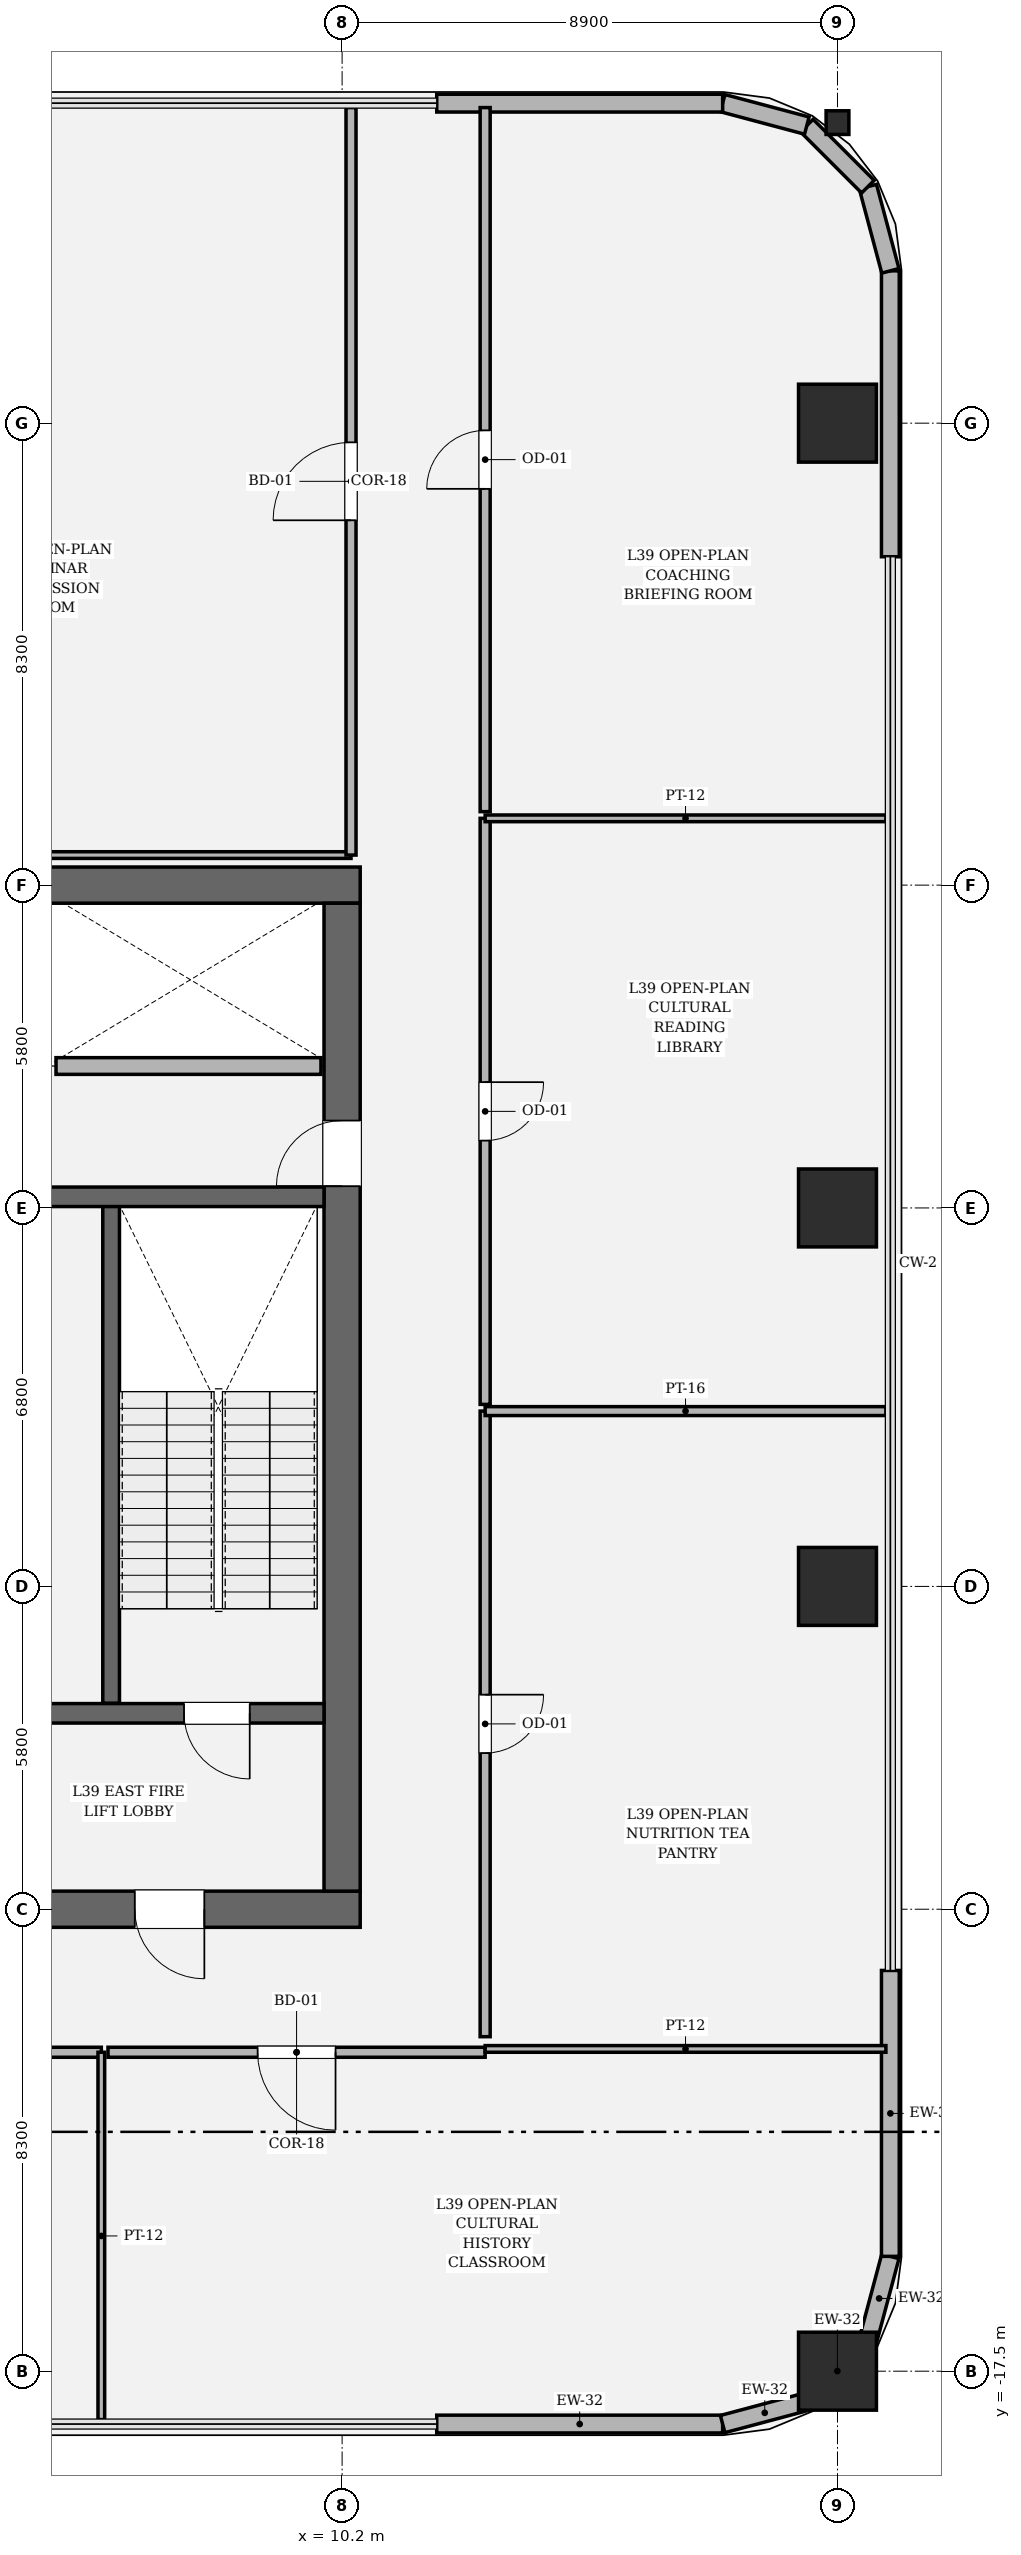
"""IFC4 building model, lengths in metres.
Left out: names, types, materials, properties, quantities, classifications, styles, units other than length and angle.
Written with IfcOpenShell. Run it as: python <this file> out.ifc"""

import sys

from ifc_helpers import new_model, si_unit, direction, frame, frame_2d, origin, origin_2d, place, context, subcontext, project, spatial, rectangle, hollow_rectangle, i_section, extrude, element, fill, save


model = new_model("IFC4")
c1 = context("Model", 3, precision=1e-05, world=origin(), true_north=direction((0.0, 1.0)))
c2 = subcontext(c1, "Body", "Model", "MODEL_VIEW")
j1 = project(units=[si_unit("LENGTHUNIT", "METRE"), si_unit("PLANEANGLEUNIT", "RADIAN")], contexts=[c1])
p1 = place(None, origin())
s1 = spatial("IfcSite", under=j1, at=p1, CompositionType="ELEMENT")
p2 = place(p1, origin())
s2 = spatial("IfcBuilding", under=s1, at=p2, CompositionType="ELEMENT")
p3 = place(p2, frame((0.0, 0.0, 168.15)))
s3 = spatial("IfcBuildingStorey", under=s2, at=p3, CompositionType="ELEMENT", Elevation=168.15)
p4 = place(p3, frame((10.525, -9.2, 0.0), z_axis=(0.0, 0.0, 1.0), x_axis=(-1.0, 0.0, 0.0)))
e1 = element("IfcWall", 1, at=p4, inside=s3, PredefinedType="SHEAR", context=c2, shape_type="SweptSolid", body=[
    extrude(rectangle(XDim=21.05, YDim=0.65, at=frame_2d((10.525, 0.0))), origin(), (0.0, 0.0, 1.0), 4.05),
])
p5 = place(p4, frame((2.8, 0.0, 0.0)))
e2 = element("IfcOpeningElement", 2, at=p5, cuts=e1, PredefinedType="OPENING", context=c2, shape_type="SweptSolid", body=[
    extrude(rectangle(XDim=1.25, YDim=2.25, at=frame_2d((0.625, 1.125))), frame((0.0, 0.335, 0.0), z_axis=(0.0, -1.0, 0.0), x_axis=(1.0, 0.0, 0.0)), (0.0, 0.0, 1.0), 0.67),
])
p6 = place(p4, frame((17.0, 0.0, 0.0)))
e3 = element("IfcOpeningElement", 3, at=p6, cuts=e1, PredefinedType="OPENING", context=c2, shape_type="SweptSolid", body=[
    extrude(rectangle(XDim=1.25, YDim=2.25, at=frame_2d((0.625, 1.125))), frame((0.0, 0.335, 0.0), z_axis=(0.0, -1.0, 0.0), x_axis=(1.0, 0.0, 0.0)), (0.0, 0.0, 1.0), 0.67),
])
p7 = place(p3, frame((-10.525, 9.2, 0.0), z_axis=(0.0, 0.0, 1.0), x_axis=(1.0, 0.0, 0.0)))
e4 = element("IfcWall", 4, at=p7, inside=s3, PredefinedType="SHEAR", context=c2, shape_type="SweptSolid", body=[
    extrude(rectangle(XDim=21.05, YDim=0.65, at=frame_2d((10.525, 0.0))), origin(), (0.0, 0.0, 1.0), 4.05),
])
p8 = place(p3, frame((10.2, 8.875, 0.0), z_axis=(0.0, 0.0, 1.0), x_axis=(0.0, -1.0, 0.0)))
e5 = element("IfcWall", 5, at=p8, inside=s3, PredefinedType="SHEAR", context=c2, shape_type="SweptSolid", body=[
    extrude(rectangle(XDim=17.75, YDim=0.65, at=frame_2d((8.875, 0.0))), origin(), (0.0, 0.0, 1.0), 4.05),
])
p9 = place(p8, frame((3.905, 0.0, 0.0)))
e6 = element("IfcOpeningElement", 6, at=p9, cuts=e5, PredefinedType="OPENING", context=c2, shape_type="SweptSolid", body=[
    extrude(rectangle(XDim=1.18, YDim=2.2, at=frame_2d((0.59, 1.1))), frame((0.0, 0.335, 0.0), z_axis=(0.0, -1.0, 0.0), x_axis=(1.0, 0.0, 0.0)), (0.0, 0.0, 1.0), 0.67),
])
p10 = place(p3, frame((6.05, 3.45, 0.0), z_axis=(0.0, 0.0, 1.0), x_axis=(0.0, -1.0, 0.0)))
e7 = element("IfcWall", 7, at=p10, inside=s3, PredefinedType="SOLIDWALL", context=c2, shape_type="SweptSolid", body=[
    extrude(rectangle(XDim=8.95, YDim=0.3, at=frame_2d((4.475, 0.0))), origin(), (0.0, 0.0, 1.0), 4.05),
])
p11 = place(p3, frame((4.65, -5.68, 0.0), z_axis=(0.0, 0.0, 1.0), x_axis=(1.0, 0.0, 0.0)))
e8 = element("IfcWall", 8, at=p11, inside=s3, PredefinedType="SOLIDWALL", context=c2, shape_type="SweptSolid", body=[
    extrude(rectangle(XDim=5.225, YDim=0.35, at=frame_2d((2.613, 0.0))), origin(), (0.0, 0.0, 1.0), 4.05),
])
p12 = place(p11, frame((2.71, 0.0, 0.0)))
e9 = element("IfcOpeningElement", 9, at=p12, cuts=e8, PredefinedType="OPENING", context=c2, shape_type="SweptSolid", body=[
    extrude(rectangle(XDim=1.18, YDim=2.2, at=frame_2d((0.59, 1.1))), frame((0.0, 0.185, 0.0), z_axis=(0.0, -1.0, 0.0), x_axis=(1.0, 0.0, 0.0)), (0.0, 0.0, 1.0), 0.37),
])
p13 = place(p3, frame((4.65, 3.6, 0.0), z_axis=(0.0, 0.0, 1.0), x_axis=(1.0, 0.0, 0.0)))
e10 = element("IfcWall", 10, at=p13, inside=s3, PredefinedType="SOLIDWALL", context=c2, shape_type="SweptSolid", body=[
    extrude(rectangle(XDim=5.225, YDim=0.35, at=frame_2d((2.613, 0.0))), origin(), (0.0, 0.0, 1.0), 4.05),
])
for number, where, z_axis, x_axis in (
    (11, (19.1, -17.5, 0.0), (0.0, 0.0, 1.0), (1.0, 0.0, 0.0)),
    (12, (19.1, -3.4, 0.0), (0.0, 0.0, 1.0), (1.0, 0.0, 0.0)),
    (13, (19.1, 3.4, 0.0), (0.0, 0.0, 1.0), (1.0, 0.0, 0.0)),
    (14, (19.1, 17.5, 0.0), (0.0, 0.0, 1.0), (1.0, 0.0, 0.0)),
):
    element("IfcColumn", number, at=place(p3, frame(where, z_axis=z_axis, x_axis=x_axis)), inside=s3, PredefinedType="COLUMN", context=c2, shape_type="SweptSolid", body=[
        extrude(hollow_rectangle(XDim=1.4, YDim=1.4, WallThickness=0.042, at=origin_2d()), origin(), (0.0, 0.0, 1.0), 4.05),
    ])
p14 = place(p3, frame((19.1, 22.9, 0.0), z_axis=(0.0, 0.0, 1.0), x_axis=(1.0, 0.0, 0.0)))
e15 = element("IfcColumn", 15, at=p14, inside=s3, PredefinedType="COLUMN", context=c2, shape_type="SweptSolid", body=[
    extrude(i_section(OverallWidth=0.409, OverallDepth=0.425, WebThickness=0.032, FlangeThickness=0.052, FilletRadius=0.018, at=origin_2d()), origin(), (0.0, 0.0, 1.0), 4.048),
])
p15 = place(p3, frame((11.9, -18.45, 0.0), z_axis=(0.0, 0.0, 1.0), x_axis=(1.0, 0.0, 0.0)))
e16 = element("IfcWall", 16, at=p15, inside=s3, PredefinedType="SOLIDWALL", context=c2, shape_type="SweptSolid", body=[
    extrude(rectangle(XDim=5.137, YDim=0.32, at=frame_2d((2.568, 0.0))), origin(), (0.0, 0.0, 1.0), 3.77),
])
p16 = place(p3, frame((17.037, -18.45, 0.0), z_axis=(0.0, 0.0, 1.0), x_axis=(0.966224582397, 0.257701486942, 0.0)))
e17 = element("IfcWall", 17, at=p16, inside=s3, PredefinedType="SOLIDWALL", context=c2, shape_type="SweptSolid", body=[
    extrude(rectangle(XDim=1.565, YDim=0.32, at=frame_2d((0.783, 0.0))), origin(), (0.0, 0.0, 1.0), 3.77),
])
p17 = place(p3, frame((18.549, -18.047, 0.0), z_axis=(0.0, 0.0, 1.0), x_axis=(0.707106781187, 0.707106781187, 0.0)))
e18 = element("IfcWall", 18, at=p17, inside=s3, PredefinedType="SOLIDWALL", context=c2, shape_type="SweptSolid", body=[
    extrude(rectangle(XDim=1.552, YDim=0.32, at=frame_2d((0.776, 0.0))), origin(), (0.0, 0.0, 1.0), 2.444),
])
p18 = place(p3, frame((19.646, -16.949, 0.0), z_axis=(0.0, 0.0, 1.0), x_axis=(0.257847112249, 0.966185730957, 0.0)))
e19 = element("IfcWall", 19, at=p18, inside=s3, PredefinedType="SOLIDWALL", context=c2, shape_type="SweptSolid", body=[
    extrude(rectangle(XDim=1.565, YDim=0.32, at=frame_2d((0.783, 0.0))), origin(), (0.0, 0.0, 1.0), 3.77),
])
p19 = place(p3, frame((20.05, -15.437, 0.0), z_axis=(0.0, 0.0, 1.0), x_axis=(0.0, 1.0, 0.0)))
e20 = element("IfcWall", 20, at=p19, inside=s3, PredefinedType="SOLIDWALL", context=c2, shape_type="SweptSolid", body=[
    extrude(rectangle(XDim=5.137, YDim=0.32, at=frame_2d((2.568, 0.0))), origin(), (0.0, 0.0, 1.0), 3.77),
])
p20 = place(p3, frame((20.05, 15.1, 0.0), z_axis=(0.0, 0.0, 1.0), x_axis=(0.0, 1.0, 0.0)))
e21 = element("IfcWall", 21, at=p20, inside=s3, PredefinedType="SOLIDWALL", context=c2, shape_type="SweptSolid", body=[
    extrude(rectangle(XDim=5.137, YDim=0.32, at=frame_2d((2.568, 0.0))), origin(), (0.0, 0.0, 1.0), 3.77),
])
p21 = place(p3, frame((20.05, 20.237, 0.0), z_axis=(0.0, 0.0, 1.0), x_axis=(-0.257847112249, 0.966185730957, 0.0)))
e22 = element("IfcWall", 22, at=p21, inside=s3, PredefinedType="SOLIDWALL", context=c2, shape_type="SweptSolid", body=[
    extrude(rectangle(XDim=1.565, YDim=0.32, at=frame_2d((0.783, 0.0))), origin(), (0.0, 0.0, 1.0), 3.77),
])
p22 = place(p3, frame((19.646, 21.749, 0.0), z_axis=(0.0, 0.0, 1.0), x_axis=(-0.707028130747, 0.707185422879, 0.0)))
e23 = element("IfcWall", 23, at=p22, inside=s3, PredefinedType="SOLIDWALL", context=c2, shape_type="SweptSolid", body=[
    extrude(rectangle(XDim=1.552, YDim=0.32, at=frame_2d((0.776, 0.0))), origin(), (0.0, 0.0, 1.0), 3.77),
])
p23 = place(p3, frame((18.549, 22.847, 0.0), z_axis=(0.0, 0.0, 1.0), x_axis=(-0.966224582397, 0.257701486942, 0.0)))
e24 = element("IfcWall", 24, at=p23, inside=s3, PredefinedType="SOLIDWALL", context=c2, shape_type="SweptSolid", body=[
    extrude(rectangle(XDim=1.565, YDim=0.32, at=frame_2d((0.783, 0.0))), origin(), (0.0, 0.0, 1.0), 3.77),
])
p24 = place(p3, frame((17.037, 23.25, 0.0), z_axis=(0.0, 0.0, 1.0), x_axis=(-1.0, 0.0, 0.0)))
e25 = element("IfcWall", 25, at=p24, inside=s3, PredefinedType="SOLIDWALL", context=c2, shape_type="SweptSolid", body=[
    extrude(rectangle(XDim=5.137, YDim=0.32, at=frame_2d((2.568, 0.0))), origin(), (0.0, 0.0, 1.0), 3.77),
])
p25 = place(p3, frame((5.06, 5.95, 0.0), z_axis=(0.0, 0.0, 1.0), x_axis=(1.0, 0.0, 0.0)))
e26 = element("IfcWall", 26, at=p25, inside=s3, PredefinedType="SOLIDWALL", context=c2, shape_type="SweptSolid", body=[
    extrude(rectangle(XDim=4.76, YDim=0.3, at=frame_2d((2.38, 0.0))), origin(), (0.0, 0.0, 1.0), 3.77),
])
p26 = place(p3, frame((-7.4, -11.77, 0.0), z_axis=(0.0, 0.0, 1.0), x_axis=(1.0, 0.0, 0.0)))
e27 = element("IfcWall", 27, at=p26, inside=s3, PredefinedType="PARTITIONING", context=c2, shape_type="SweptSolid", body=[
    extrude(rectangle(XDim=13.274, YDim=0.18, at=frame_2d((6.637, 0.0))), origin(), (0.0, 0.0, 1.0), 2.444),
])
p27 = place(p3, frame((5.874, -11.77, 0.0), z_axis=(0.0, 0.0, 1.0), x_axis=(0.0, -1.0, 0.0)))
e28 = element("IfcWall", 28, at=p27, inside=s3, PredefinedType="PARTITIONING", context=c2, shape_type="SweptSolid", body=[
    extrude(rectangle(XDim=6.6, YDim=0.12, at=frame_2d((3.3, 0.0))), origin(), (0.0, 0.0, 1.0), 2.444),
])
p28 = place(p3, frame((5.994, -11.77, 0.0), z_axis=(0.0, 0.0, 1.0), x_axis=(1.0, 0.0, 0.0)))
e29 = element("IfcWall", 29, at=p28, inside=s3, PredefinedType="PARTITIONING", context=c2, shape_type="SweptSolid", body=[
    extrude(rectangle(XDim=6.776, YDim=0.18, at=frame_2d((3.388, 0.0))), origin(), (0.0, 0.0, 1.0), 2.444),
])
p29 = place(p28, frame((2.688, 0.0, 0.0)))
e30 = element("IfcOpeningElement", 30, at=p29, cuts=e29, PredefinedType="OPENING", context=c2, shape_type="SweptSolid", body=[
    extrude(rectangle(XDim=1.4, YDim=2.25, at=frame_2d((0.7, 1.125))), frame((0.0, 0.1, 0.0), z_axis=(0.0, -1.0, 0.0), x_axis=(1.0, 0.0, 0.0)), (0.0, 0.0, 1.0), 0.2),
])
p30 = place(p3, frame((12.77, -11.71, 0.0), z_axis=(0.0, 0.0, 1.0), x_axis=(1.0, 0.0, 0.0)))
e31 = element("IfcWall", 31, at=p30, inside=s3, PredefinedType="PARTITIONING", context=c2, shape_type="SweptSolid", body=[
    extrude(rectangle(XDim=7.2, YDim=0.12, at=frame_2d((3.6, 0.0))), origin(), (0.0, 0.0, 1.0), 2.444),
])
p31 = place(p3, frame((12.77, -11.49, 0.0), z_axis=(0.0, 0.0, 1.0), x_axis=(0.0, 1.0, 0.0)))
e32 = element("IfcWall", 32, at=p31, inside=s3, PredefinedType="PARTITIONING", context=c2, shape_type="SweptSolid", body=[
    extrude(rectangle(XDim=11.24, YDim=0.18, at=frame_2d((5.62, 0.0))), origin(), (0.0, 0.0, 1.0), 2.444),
])
p32 = place(p31, frame((5.095, 0.0, 0.0)))
e33 = element("IfcOpeningElement", 33, at=p32, cuts=e32, PredefinedType="OPENING", context=c2, shape_type="SweptSolid", body=[
    extrude(rectangle(XDim=1.05, YDim=2.2, at=frame_2d((0.525, 1.1))), frame((0.0, 0.1, 0.0), z_axis=(0.0, -1.0, 0.0), x_axis=(1.0, 0.0, 0.0)), (0.0, 0.0, 1.0), 0.2),
])
p33 = place(p3, frame((12.77, -0.25, 0.0), z_axis=(0.0, 0.0, 1.0), x_axis=(1.0, 0.0, 0.0)))
e34 = element("IfcWall", 34, at=p33, inside=s3, PredefinedType="PARTITIONING", context=c2, shape_type="SweptSolid", body=[
    extrude(rectangle(XDim=7.2, YDim=0.16, at=frame_2d((3.6, 0.0))), origin(), (0.0, 0.0, 1.0), 2.444),
])
p34 = place(p3, frame((12.77, -0.13, 0.0), z_axis=(0.0, 0.0, 1.0), x_axis=(0.0, 1.0, 0.0)))
e35 = element("IfcWall", 35, at=p34, inside=s3, PredefinedType="PARTITIONING", context=c2, shape_type="SweptSolid", body=[
    extrude(rectangle(XDim=10.53, YDim=0.18, at=frame_2d((5.265, 0.0))), origin(), (0.0, 0.0, 1.0), 2.444),
])
p35 = place(p34, frame((4.74, 0.0, 0.0)))
e36 = element("IfcOpeningElement", 36, at=p35, cuts=e35, PredefinedType="OPENING", context=c2, shape_type="SweptSolid", body=[
    extrude(rectangle(XDim=1.05, YDim=2.2, at=frame_2d((0.525, 1.1))), frame((0.0, 0.1, 0.0), z_axis=(0.0, -1.0, 0.0), x_axis=(1.0, 0.0, 0.0)), (0.0, 0.0, 1.0), 0.2),
])
p36 = place(p3, frame((12.77, 10.4, 0.0), z_axis=(0.0, 0.0, 1.0), x_axis=(1.0, 0.0, 0.0)))
e37 = element("IfcWall", 37, at=p36, inside=s3, PredefinedType="PARTITIONING", context=c2, shape_type="SweptSolid", body=[
    extrude(rectangle(XDim=7.2, YDim=0.12, at=frame_2d((3.6, 0.0))), origin(), (0.0, 0.0, 1.0), 2.444),
])
p37 = place(p3, frame((10.36, 9.74, 0.0), z_axis=(0.0, 0.0, 1.0), x_axis=(-1.0, 0.0, 0.0)))
e38 = element("IfcWall", 38, at=p37, inside=s3, PredefinedType="PARTITIONING", context=c2, shape_type="SweptSolid", body=[
    extrude(rectangle(XDim=10.3, YDim=0.12, at=frame_2d((5.15, 0.0))), origin(), (0.0, 0.0, 1.0), 2.444),
])
p38 = place(p3, frame((10.36, 23.17, 0.0), z_axis=(0.0, 0.0, 1.0), x_axis=(0.0, -1.0, 0.0)))
e39 = element("IfcWall", 39, at=p38, inside=s3, PredefinedType="PARTITIONING", context=c2, shape_type="SweptSolid", body=[
    extrude(rectangle(XDim=13.43, YDim=0.18, at=frame_2d((6.715, 0.0))), origin(), (0.0, 0.0, 1.0), 2.444),
])
p39 = place(p38, frame((6.015, 0.0, 0.0)))
e40 = element("IfcOpeningElement", 40, at=p39, cuts=e39, PredefinedType="OPENING", context=c2, shape_type="SweptSolid", body=[
    extrude(rectangle(XDim=1.4, YDim=2.25, at=frame_2d((0.7, 1.125))), frame((0.0, 0.1, 0.0), z_axis=(0.0, -1.0, 0.0), x_axis=(1.0, 0.0, 0.0)), (0.0, 0.0, 1.0), 0.2),
])
p40 = place(p3, frame((12.77, 10.52, 0.0), z_axis=(0.0, 0.0, 1.0), x_axis=(0.0, 1.0, 0.0)))
e41 = element("IfcWall", 41, at=p40, inside=s3, PredefinedType="PARTITIONING", context=c2, shape_type="SweptSolid", body=[
    extrude(rectangle(XDim=12.65, YDim=0.18, at=frame_2d((6.325, 0.0))), origin(), (0.0, 0.0, 1.0), 2.444),
])
p41 = place(p40, frame((5.8, 0.0, 0.0)))
e42 = element("IfcOpeningElement", 42, at=p41, cuts=e41, PredefinedType="OPENING", context=c2, shape_type="SweptSolid", body=[
    extrude(rectangle(XDim=1.05, YDim=2.2, at=frame_2d((0.525, 1.1))), frame((0.0, 0.1, 0.0), z_axis=(0.0, -1.0, 0.0), x_axis=(1.0, 0.0, 0.0)), (0.0, 0.0, 1.0), 0.2),
])
p42 = place(p12, origin())
e43 = element("IfcDoor", 43, at=p42, inside=s3, OperationType="SINGLE_SWING_RIGHT", PredefinedType="DOOR", context=c2, shape_type="SweptSolid", body=[
    extrude(rectangle(XDim=1.18, YDim=2.2, at=frame_2d((0.59, 1.1))), frame((0.0, 0.025, 0.0), z_axis=(0.0, -1.0, 0.0), x_axis=(1.0, 0.0, 0.0)), (0.0, 0.0, 1.0), 0.05),
])
fill(e9, e43)
p43 = place(p5, origin())
e44 = element("IfcDoor", 44, at=p43, inside=s3, OperationType="SINGLE_SWING_LEFT", PredefinedType="DOOR", context=c2, shape_type="SweptSolid", body=[
    extrude(rectangle(XDim=1.25, YDim=2.25, at=frame_2d((0.625, 1.125))), frame((0.0, 0.025, 0.0), z_axis=(0.0, -1.0, 0.0), x_axis=(1.0, 0.0, 0.0)), (0.0, 0.0, 1.0), 0.05),
])
fill(e2, e44)
p44 = place(p9, origin())
e45 = element("IfcDoor", 45, at=p44, inside=s3, OperationType="SINGLE_SWING_RIGHT", PredefinedType="DOOR", context=c2, shape_type="SweptSolid", body=[
    extrude(rectangle(XDim=1.18, YDim=2.2, at=frame_2d((0.59, 1.1))), frame((0.0, 0.025, 0.0), z_axis=(0.0, -1.0, 0.0), x_axis=(1.0, 0.0, 0.0)), (0.0, 0.0, 1.0), 0.05),
])
fill(e6, e45)
p45 = place(p29, origin())
e46 = element("IfcDoor", 46, at=p45, inside=s3, OperationType="SINGLE_SWING_RIGHT", PredefinedType="DOOR", context=c2, shape_type="SweptSolid", body=[
    extrude(rectangle(XDim=1.4, YDim=2.25, at=frame_2d((0.7, 1.125))), frame((0.0, 0.025, 0.0), z_axis=(0.0, -1.0, 0.0), x_axis=(1.0, 0.0, 0.0)), (0.0, 0.0, 1.0), 0.05),
])
fill(e30, e46)
p46 = place(p32, origin())
e47 = element("IfcDoor", 47, at=p46, inside=s3, OperationType="SINGLE_SWING_RIGHT", PredefinedType="DOOR", context=c2, shape_type="SweptSolid", body=[
    extrude(rectangle(XDim=1.05, YDim=2.2, at=frame_2d((0.525, 1.1))), frame((0.0, 0.025, 0.0), z_axis=(0.0, -1.0, 0.0), x_axis=(1.0, 0.0, 0.0)), (0.0, 0.0, 1.0), 0.05),
])
fill(e33, e47)
p47 = place(p35, origin())
e48 = element("IfcDoor", 48, at=p47, inside=s3, OperationType="SINGLE_SWING_RIGHT", PredefinedType="DOOR", context=c2, shape_type="SweptSolid", body=[
    extrude(rectangle(XDim=1.05, YDim=2.2, at=frame_2d((0.525, 1.1))), frame((0.0, 0.025, 0.0), z_axis=(0.0, -1.0, 0.0), x_axis=(1.0, 0.0, 0.0)), (0.0, 0.0, 1.0), 0.05),
])
fill(e36, e48)
p48 = place(p39, origin())
e49 = element("IfcDoor", 49, at=p48, inside=s3, OperationType="SINGLE_SWING_RIGHT", PredefinedType="DOOR", context=c2, shape_type="SweptSolid", body=[
    extrude(rectangle(XDim=1.4, YDim=2.25, at=frame_2d((0.7, 1.125))), frame((0.0, 0.025, 0.0), z_axis=(0.0, -1.0, 0.0), x_axis=(1.0, 0.0, 0.0)), (0.0, 0.0, 1.0), 0.05),
])
fill(e40, e49)
p49 = place(p41, origin())
e50 = element("IfcDoor", 50, at=p49, inside=s3, OperationType="SINGLE_SWING_LEFT", PredefinedType="DOOR", context=c2, shape_type="SweptSolid", body=[
    extrude(rectangle(XDim=1.05, YDim=2.2, at=frame_2d((0.525, 1.1))), frame((0.0, 0.025, 0.0), z_axis=(0.0, -1.0, 0.0), x_axis=(1.0, 0.0, 0.0)), (0.0, 0.0, 1.0), 0.05),
])
fill(e42, e50)
save(model, sys.argv[1])
